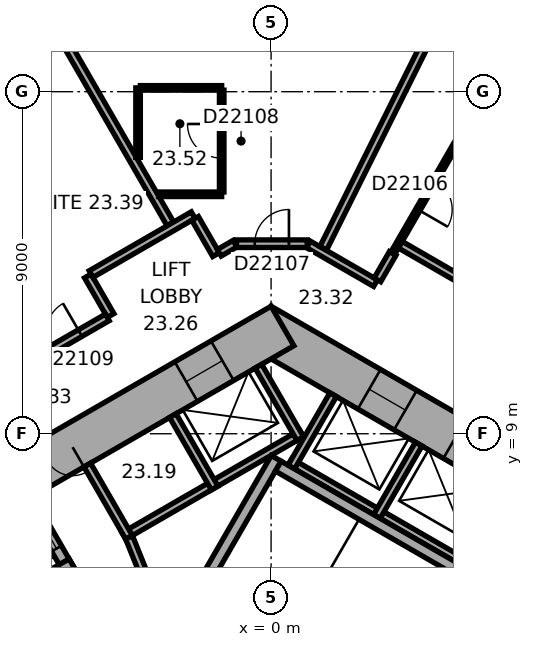
"""IFC4 building model, lengths in metres.
Left out: names, types, materials, properties, quantities, classifications, styles, units other than length and angle.
Written with IfcOpenShell. Run it as: python <this file> out.ifc"""

import sys

from ifc_helpers import new_model, si_unit, direction, frame, frame_2d, origin, place, context, subcontext, project, spatial, rectangle, extrude, element, fill, save


model = new_model("IFC4")
c1 = context("Model", 3, precision=1e-05, world=origin(), true_north=direction((0.0, 1.0)))
c2 = subcontext(c1, "Body", "Model", "MODEL_VIEW")
j1 = project(units=[si_unit("LENGTHUNIT", "METRE"), si_unit("PLANEANGLEUNIT", "RADIAN")], contexts=[c1])
p1 = place(None, origin())
s1 = spatial("IfcSite", under=j1, at=p1, CompositionType="ELEMENT")
p2 = place(p1, origin())
s2 = spatial("IfcBuilding", under=s1, at=p2, CompositionType="ELEMENT")
p3 = place(p2, frame((0.0, 0.0, 100.1)))
s3 = spatial("IfcBuildingStorey", under=s2, at=p3, CompositionType="ELEMENT", Elevation=100.1)
p4 = place(p3, frame((10.4, 5.658, 0.0), z_axis=(0.0, 0.0, 1.0), x_axis=(-0.866021384402, 0.500006961711, 0.0)))
e1 = element("IfcWall", 1, at=p4, inside=s3, PredefinedType="SHEAR", context=c2, shape_type="SweptSolid", body=[
    extrude(rectangle(XDim=12.355, YDim=1.2, at=frame_2d((6.178, 0.0))), origin(), (0.0, 0.0, 1.0), 3.3),
])
p5 = place(p4, frame((2.728, 0.0, 0.0)))
e2 = element("IfcOpeningElement", 2, at=p5, cuts=e1, PredefinedType="OPENING", context=c2, shape_type="SweptSolid", body=[
    extrude(rectangle(XDim=1.1, YDim=2.1, at=frame_2d((0.55, 1.05))), frame((0.0, 0.61, 0.0), z_axis=(0.0, -1.0, 0.0), x_axis=(1.0, 0.0, 0.0)), (0.0, 0.0, 1.0), 1.22),
])
p6 = place(p4, frame((5.328, 0.0, 0.0)))
e3 = element("IfcOpeningElement", 3, at=p6, cuts=e1, PredefinedType="OPENING", context=c2, shape_type="SweptSolid", body=[
    extrude(rectangle(XDim=1.1, YDim=2.1, at=frame_2d((0.55, 1.05))), frame((0.0, 0.61, 0.0), z_axis=(0.0, -1.0, 0.0), x_axis=(1.0, 0.0, 0.0)), (0.0, 0.0, 1.0), 1.22),
])
p7 = place(p4, frame((7.928, 0.0, 0.0)))
e4 = element("IfcOpeningElement", 4, at=p7, cuts=e1, PredefinedType="OPENING", context=c2, shape_type="SweptSolid", body=[
    extrude(rectangle(XDim=1.1, YDim=2.1, at=frame_2d((0.55, 1.05))), frame((0.0, 0.61, 0.0), z_axis=(0.0, -1.0, 0.0), x_axis=(1.0, 0.0, 0.0)), (0.0, 0.0, 1.0), 1.22),
])
p8 = place(p3, frame((0.3, 11.836, 0.0), z_axis=(0.0, 0.0, 1.0), x_axis=(-0.866021384402, -0.500006961711, 0.0)))
e5 = element("IfcWall", 5, at=p8, inside=s3, PredefinedType="SHEAR", context=c2, shape_type="SweptSolid", body=[
    extrude(rectangle(XDim=12.355, YDim=1.2, at=frame_2d((6.178, 0.0))), origin(), (0.0, 0.0, 1.0), 3.3),
])
p9 = place(p8, frame((6.378, 0.0, 0.0)))
e6 = element("IfcOpeningElement", 6, at=p9, cuts=e5, PredefinedType="OPENING", context=c2, shape_type="SweptSolid", body=[
    extrude(rectangle(XDim=1.5, YDim=2.1, at=frame_2d((0.75, 1.05))), frame((0.0, 0.61, 0.0), z_axis=(0.0, -1.0, 0.0), x_axis=(1.0, 0.0, 0.0)), (0.0, 0.0, 1.0), 1.22),
])
p10 = place(p8, frame((1.828, 0.0, 0.0)))
e7 = element("IfcOpeningElement", 7, at=p10, cuts=e5, PredefinedType="OPENING", context=c2, shape_type="SweptSolid", body=[
    extrude(rectangle(XDim=1.1, YDim=2.1, at=frame_2d((0.55, 1.05))), frame((0.0, 0.61, 0.0), z_axis=(0.0, -1.0, 0.0), x_axis=(1.0, 0.0, 0.0)), (0.0, 0.0, 1.0), 1.22),
])
p11 = place(p3, frame((20.63, 15.47, 0.0), z_axis=(0.0, 0.0, 1.0), x_axis=(-0.894934518609, 0.446197498203, 0.0)))
e8 = element("IfcWall", 8, at=p11, inside=s3, PredefinedType="STANDARD", context=c2, shape_type="SweptSolid", body=[
    extrude(rectangle(XDim=21.246, YDim=0.2, at=frame_2d((10.623, 0.0))), origin(), (0.0, 0.0, 1.0), 3.3),
])
p12 = place(p11, frame((1.553, 0.0, 0.8)))
e9 = element("IfcOpeningElement", 9, at=p12, cuts=e8, PredefinedType="OPENING", context=c2, shape_type="SweptSolid", body=[
    extrude(rectangle(XDim=2.4, YDim=1.7, at=frame_2d((1.2, 0.85))), frame((0.0, 0.11, 0.0), z_axis=(0.0, -1.0, 0.0), x_axis=(1.0, 0.0, 0.0)), (0.0, 0.0, 1.0), 0.22),
])
p13 = place(p11, frame((5.488, 0.0, 0.8)))
e10 = element("IfcOpeningElement", 10, at=p13, cuts=e8, PredefinedType="OPENING", context=c2, shape_type="SweptSolid", body=[
    extrude(rectangle(XDim=2.4, YDim=1.7, at=frame_2d((1.2, 0.85))), frame((0.0, 0.11, 0.0), z_axis=(0.0, -1.0, 0.0), x_axis=(1.0, 0.0, 0.0)), (0.0, 0.0, 1.0), 0.22),
])
p14 = place(p11, frame((9.422, 0.0, 0.8)))
e11 = element("IfcOpeningElement", 11, at=p14, cuts=e8, PredefinedType="OPENING", context=c2, shape_type="SweptSolid", body=[
    extrude(rectangle(XDim=2.4, YDim=1.7, at=frame_2d((1.2, 0.85))), frame((0.0, 0.11, 0.0), z_axis=(0.0, -1.0, 0.0), x_axis=(1.0, 0.0, 0.0)), (0.0, 0.0, 1.0), 0.22),
])
p15 = place(p11, frame((13.357, 0.0, 0.8)))
e12 = element("IfcOpeningElement", 12, at=p15, cuts=e8, PredefinedType="OPENING", context=c2, shape_type="SweptSolid", body=[
    extrude(rectangle(XDim=2.4, YDim=1.7, at=frame_2d((1.2, 0.85))), frame((0.0, 0.11, 0.0), z_axis=(0.0, -1.0, 0.0), x_axis=(1.0, 0.0, 0.0)), (0.0, 0.0, 1.0), 0.22),
])
p16 = place(p11, frame((17.292, 0.0, 0.8)))
e13 = element("IfcOpeningElement", 13, at=p16, cuts=e8, PredefinedType="OPENING", context=c2, shape_type="SweptSolid", body=[
    extrude(rectangle(XDim=2.4, YDim=1.7, at=frame_2d((1.2, 0.85))), frame((0.0, 0.11, 0.0), z_axis=(0.0, -1.0, 0.0), x_axis=(1.0, 0.0, 0.0)), (0.0, 0.0, 1.0), 0.22),
])
p17 = place(p3, frame((-3.136, 24.805, 0.0), z_axis=(0.0, 0.0, 1.0), x_axis=(-0.866028291626, -0.499994998079, 0.0)))
e14 = element("IfcWall", 14, at=p17, inside=s3, PredefinedType="STANDARD", context=c2, shape_type="SweptSolid", body=[
    extrude(rectangle(XDim=21.246, YDim=0.2, at=frame_2d((10.623, 0.0))), origin(), (0.0, 0.0, 1.0), 3.3),
])
p18 = place(p17, frame((1.555, 0.0, 0.8)))
e15 = element("IfcOpeningElement", 15, at=p18, cuts=e14, PredefinedType="OPENING", context=c2, shape_type="SweptSolid", body=[
    extrude(rectangle(XDim=2.4, YDim=1.7, at=frame_2d((1.2, 0.85))), frame((0.0, 0.11, 0.0), z_axis=(0.0, -1.0, 0.0), x_axis=(1.0, 0.0, 0.0)), (0.0, 0.0, 1.0), 0.22),
])
p19 = place(p17, frame((5.489, 0.0, 0.8)))
e16 = element("IfcOpeningElement", 16, at=p19, cuts=e14, PredefinedType="OPENING", context=c2, shape_type="SweptSolid", body=[
    extrude(rectangle(XDim=2.4, YDim=1.7, at=frame_2d((1.2, 0.85))), frame((0.0, 0.11, 0.0), z_axis=(0.0, -1.0, 0.0), x_axis=(1.0, 0.0, 0.0)), (0.0, 0.0, 1.0), 0.22),
])
p20 = place(p17, frame((9.424, 0.0, 0.8)))
e17 = element("IfcOpeningElement", 17, at=p20, cuts=e14, PredefinedType="OPENING", context=c2, shape_type="SweptSolid", body=[
    extrude(rectangle(XDim=2.4, YDim=1.7, at=frame_2d((1.2, 0.85))), frame((0.0, 0.11, 0.0), z_axis=(0.0, -1.0, 0.0), x_axis=(1.0, 0.0, 0.0)), (0.0, 0.0, 1.0), 0.22),
])
p21 = place(p17, frame((13.358, 0.0, 0.8)))
e18 = element("IfcOpeningElement", 18, at=p21, cuts=e14, PredefinedType="OPENING", context=c2, shape_type="SweptSolid", body=[
    extrude(rectangle(XDim=2.4, YDim=1.7, at=frame_2d((1.2, 0.85))), frame((0.0, 0.11, 0.0), z_axis=(0.0, -1.0, 0.0), x_axis=(1.0, 0.0, 0.0)), (0.0, 0.0, 1.0), 0.22),
])
p22 = place(p17, frame((17.293, 0.0, 0.8)))
e19 = element("IfcOpeningElement", 19, at=p22, cuts=e14, PredefinedType="OPENING", context=c2, shape_type="SweptSolid", body=[
    extrude(rectangle(XDim=2.4, YDim=1.7, at=frame_2d((1.2, 0.85))), frame((0.0, 0.11, 0.0), z_axis=(0.0, -1.0, 0.0), x_axis=(1.0, 0.0, 0.0)), (0.0, 0.0, 1.0), 0.22),
])
p23 = place(p3, frame((7.424, 4.259, 0.0), z_axis=(0.0, 0.0, 1.0), x_axis=(-0.866026010844, 0.49999894854, 0.0)))
e20 = element("IfcWall", 20, at=p23, inside=s3, PredefinedType="PARTITIONING", context=c2, shape_type="SweptSolid", body=[
    extrude(rectangle(XDim=8.0, YDim=0.2, at=frame_2d((4.0, 0.0))), origin(), (0.0, 0.0, 1.0), 3.05),
])
for number, where, z_axis, x_axis in (
    (21, (2.784, 6.822, 0.0), (0.0, 0.0, 1.0), (0.5, 0.866, 0.0)),
    (22, (0.532, 8.122, 0.0), (0.0, 0.0, 1.0), (0.5, 0.866, 0.0)),
):
    element("IfcWall", number, at=place(p3, frame(where, z_axis=z_axis, x_axis=x_axis)), inside=s3, PredefinedType="PARTITIONING", context=c2, shape_type="SweptSolid", body=[
        extrude(rectangle(XDim=2.2, YDim=0.2, at=frame_2d((1.1, 0.0))), origin(), (0.0, 0.0, 1.0), 3.05),
    ])
p24 = place(p3, frame((0.803, 9.009, 0.0), z_axis=(0.0, 0.0, 1.0), x_axis=(-0.866028230842, -0.499995103361, 0.0)))
e23 = element("IfcWall", 23, at=p24, inside=s3, PredefinedType="PARTITIONING", context=c2, shape_type="SweptSolid", body=[
    extrude(rectangle(XDim=5.4, YDim=0.2, at=frame_2d((2.7, 0.0))), origin(), (0.0, 0.0, 1.0), 3.05),
])
p25 = place(p3, frame((0.767, 8.872, 0.0), z_axis=(0.0, 0.0, 1.0), x_axis=(-0.499994660107, 0.866028486751, 0.0)))
e24 = element("IfcWall", 24, at=p25, inside=s3, PredefinedType="PARTITIONING", context=c2, shape_type="SweptSolid", body=[
    extrude(rectangle(XDim=2.2, YDim=0.2, at=frame_2d((1.1, 0.0))), origin(), (0.0, 0.0, 1.0), 3.05),
])
for number, where, z_axis, x_axis in (
    (25, (-1.485, 7.572, 0.0), (0.0, 0.0, 1.0), (-0.5, 0.866, 0.0)),
    (26, (-3.737, 6.272, 0.0), (0.0, 0.0, 1.0), (-0.5, 0.866, 0.0)),
):
    element("IfcWall", number, at=place(p3, frame(where, z_axis=z_axis, x_axis=x_axis)), inside=s3, PredefinedType="PARTITIONING", context=c2, shape_type="SweptSolid", body=[
        extrude(rectangle(XDim=2.2, YDim=0.2, at=frame_2d((1.1, 0.0))), origin(), (0.0, 0.0, 1.0), 3.05),
    ])
p26 = place(p3, frame((-2.216, 4.282, 0.0), z_axis=(0.0, 0.0, 1.0), x_axis=(0.499977259774, 0.866038532462, 0.0)))
e27 = element("IfcWall", 27, at=p26, inside=s3, PredefinedType="SHEAR", context=c2, shape_type="SweptSolid", body=[
    extrude(rectangle(XDim=4.7, YDim=0.3, at=frame_2d((2.35, 0.0))), origin(), (0.0, 0.0, 1.0), 3.05),
])
p27 = place(p3, frame((6.303, 4.617, 0.0), z_axis=(0.0, 0.0, 1.0), x_axis=(-0.866027801685, 0.499995846692, 0.0)))
e28 = element("IfcWall", 28, at=p27, inside=s3, PredefinedType="SHEAR", context=c2, shape_type="SweptSolid", body=[
    extrude(rectangle(XDim=7.06, YDim=0.3, at=frame_2d((3.53, 0.0))), origin(), (0.0, 0.0, 1.0), 3.05),
])
p28 = place(p3, frame((-5.295, 5.372, 0.0), z_axis=(0.0, 0.0, 1.0), x_axis=(-0.500077893725, 0.86598042715, 0.0)))
e29 = element("IfcWall", 29, at=p28, inside=s3, PredefinedType="SHEAR", context=c2, shape_type="SweptSolid", body=[
    extrude(rectangle(XDim=2.2, YDim=0.3, at=frame_2d((1.1, 0.0))), origin(), (0.0, 0.0, 1.0), 3.05),
])
p29 = place(p28, frame((0.7, 0.0, 0.0)))
e30 = element("IfcOpeningElement", 30, at=p29, cuts=e29, PredefinedType="OPENING", context=c2, shape_type="SweptSolid", body=[
    extrude(rectangle(XDim=1.1, YDim=2.1, at=frame_2d((0.55, 1.05))), frame((0.0, 0.16, 0.0), z_axis=(0.0, -1.0, 0.0), x_axis=(1.0, 0.0, 0.0)), (0.0, 0.0, 1.0), 0.32),
])
p30 = place(p3, frame((-5.24, 5.577, 0.0), z_axis=(0.0, 0.0, 1.0), x_axis=(-0.866014461049, -0.500018952895, 0.0)))
e31 = element("IfcWall", 31, at=p30, inside=s3, PredefinedType="SHEAR", context=c2, shape_type="SweptSolid", body=[
    extrude(rectangle(XDim=3.35, YDim=0.3, at=frame_2d((1.675, 0.0))), origin(), (0.0, 0.0, 1.0), 3.05),
])
p31 = place(p3, frame((-2.615, 3.487, 0.0), z_axis=(0.0, 0.0, 1.0), x_axis=(-0.373576831041, 0.92759924068, 0.0)))
e32 = element("IfcWall", 32, at=p31, inside=s3, PredefinedType="PARTITIONING", context=c2, shape_type="SweptSolid", body=[
    extrude(rectangle(XDim=3.002, YDim=0.2, at=frame_2d((1.501, 0.0))), origin(), (0.0, 0.0, 1.0), 3.05),
])
p32 = place(p31, frame((1.15, 0.0, 0.0)))
e33 = element("IfcOpeningElement", 33, at=p32, cuts=e32, PredefinedType="OPENING", context=c2, shape_type="SweptSolid", body=[
    extrude(rectangle(XDim=0.9, YDim=2.1, at=frame_2d((0.45, 1.05))), frame((0.0, 0.11, 0.0), z_axis=(0.0, -1.0, 0.0), x_axis=(1.0, 0.0, 0.0)), (0.0, 0.0, 1.0), 0.22),
])
p33 = place(p3, frame((-6.676, 21.492, 0.0), z_axis=(0.0, 0.0, 1.0), x_axis=(0.500011263043, -0.866018900966, 0.0)))
e34 = element("IfcWall", 34, at=p33, inside=s3, PredefinedType="PARTITIONING", context=c2, shape_type="SweptSolid", body=[
    extrude(rectangle(XDim=8.049, YDim=0.2, at=frame_2d((4.024, 0.0))), origin(), (0.0, 0.0, 1.0), 3.05),
])
p34 = place(p3, frame((-4.823, 13.152, 0.0), z_axis=(0.0, 0.0, 1.0), x_axis=(0.499986357472, -0.866033280158, 0.0)))
e35 = element("IfcWall", 35, at=p34, inside=s3, PredefinedType="PARTITIONING", context=c2, shape_type="SweptSolid", body=[
    extrude(rectangle(XDim=1.201, YDim=0.2, at=frame_2d((0.601, 0.0))), origin(), (0.0, 0.0, 1.0), 3.05),
])
p35 = place(p3, frame((-4.309, 12.061, 0.0), z_axis=(0.0, 0.0, 1.0), x_axis=(-0.866020679205, -0.500008183122, 0.0)))
e36 = element("IfcWall", 36, at=p35, inside=s3, PredefinedType="PARTITIONING", context=c2, shape_type="SweptSolid", body=[
    extrude(rectangle(XDim=5.104, YDim=0.2, at=frame_2d((2.552, 0.0))), origin(), (0.0, 0.0, 1.0), 3.05),
])
p36 = place(p35, frame((0.827, 0.0, 0.0)))
e37 = element("IfcOpeningElement", 37, at=p36, cuts=e36, PredefinedType="OPENING", context=c2, shape_type="SweptSolid", body=[
    extrude(rectangle(XDim=0.9, YDim=2.1, at=frame_2d((0.45, 1.05))), frame((0.0, 0.11, 0.0), z_axis=(0.0, -1.0, 0.0), x_axis=(1.0, 0.0, 0.0)), (0.0, 0.0, 1.0), 0.22),
])
p37 = place(p3, frame((-3.5, 16.271, 0.0), z_axis=(0.0, 0.0, 1.0), x_axis=(0.0, 1.0, 0.0)))
e38 = element("IfcWall", 38, at=p37, inside=s3, PredefinedType="PARTITIONING", context=c2, shape_type="SweptSolid", body=[
    extrude(rectangle(XDim=1.829, YDim=0.12, at=frame_2d((0.915, 0.0))), origin(), (0.0, 0.0, 1.0), 3.05),
])
p38 = place(p3, frame((-3.44, 18.101, 0.0), z_axis=(0.0, 0.0, 1.0), x_axis=(1.0, 0.0, 0.0)))
e39 = element("IfcWall", 39, at=p38, inside=s3, PredefinedType="PARTITIONING", context=c2, shape_type="SweptSolid", body=[
    extrude(rectangle(XDim=2.14, YDim=0.12, at=frame_2d((1.07, 0.0))), origin(), (0.0, 0.0, 1.0), 3.05),
])
p39 = place(p3, frame((-2.05, 14.752, 0.0), z_axis=(0.0, 0.0, 1.0), x_axis=(-0.866030936828, -0.499990416364, 0.0)))
e40 = element("IfcWall", 40, at=p39, inside=s3, PredefinedType="PARTITIONING", context=c2, shape_type="SweptSolid", body=[
    extrude(rectangle(XDim=3.102, YDim=0.2, at=frame_2d((1.551, 0.0))), origin(), (0.0, 0.0, 1.0), 3.05),
])
p40 = place(p3, frame((-1.449, 13.712, 0.0), z_axis=(0.0, 0.0, 1.0), x_axis=(-0.499978356969, 0.866037899034, 0.0)))
e41 = element("IfcWall", 41, at=p40, inside=s3, PredefinedType="PARTITIONING", context=c2, shape_type="SweptSolid", body=[
    extrude(rectangle(XDim=1.101, YDim=0.2, at=frame_2d((0.551, 0.0))), origin(), (0.0, 0.0, 1.0), 3.05),
])
p41 = place(p3, frame((-1.3, 15.301, 0.0), z_axis=(0.0, 0.0, 1.0), x_axis=(-1.0, 0.0, 0.0)))
e42 = element("IfcWall", 42, at=p41, inside=s3, PredefinedType="PARTITIONING", context=c2, shape_type="SweptSolid", body=[
    extrude(rectangle(XDim=1.661, YDim=0.12, at=frame_2d((0.831, 0.0))), origin(), (0.0, 0.0, 1.0), 3.05),
])
p42 = place(p3, frame((-1.3, 18.041, 0.0), z_axis=(0.0, 0.0, 1.0), x_axis=(0.0, -1.0, 0.0)))
e43 = element("IfcWall", 43, at=p42, inside=s3, PredefinedType="PARTITIONING", context=c2, shape_type="SweptSolid", body=[
    extrude(rectangle(XDim=2.68, YDim=0.12, at=frame_2d((1.34, 0.0))), origin(), (0.0, 0.0, 1.0), 3.05),
])
p43 = place(p42, frame((0.89, 0.0, 0.0)))
e44 = element("IfcOpeningElement", 44, at=p43, cuts=e43, PredefinedType="OPENING", context=c2, shape_type="SweptSolid", body=[
    extrude(rectangle(XDim=0.9, YDim=2.1, at=frame_2d((0.45, 1.05))), frame((0.0, 0.07, 0.0), z_axis=(0.0, -1.0, 0.0), x_axis=(1.0, 0.0, 0.0)), (0.0, 0.0, 1.0), 0.14),
])
p44 = place(p3, frame((-0.95, 14.001, 0.0), z_axis=(0.0, 0.0, 1.0), x_axis=(-0.86609177584, -0.499885022602, 0.0)))
e45 = element("IfcWall", 45, at=p44, inside=s3, PredefinedType="PARTITIONING", context=c2, shape_type="SweptSolid", body=[
    extrude(rectangle(XDim=0.477, YDim=0.2, at=frame_2d((0.238, 0.0))), origin(), (0.0, 0.0, 1.0), 3.05),
])
p45 = place(p3, frame((0.95, 14.001, 0.0), z_axis=(0.0, 0.0, 1.0), x_axis=(-1.0, 0.0, 0.0)))
e46 = element("IfcWall", 46, at=p45, inside=s3, PredefinedType="PARTITIONING", context=c2, shape_type="SweptSolid", body=[
    extrude(rectangle(XDim=1.86, YDim=0.2, at=frame_2d((0.93, 0.0))), origin(), (0.0, 0.0, 1.0), 3.05),
])
p46 = place(p45, frame((0.48, 0.0, 0.0)))
e47 = element("IfcOpeningElement", 47, at=p46, cuts=e46, PredefinedType="OPENING", context=c2, shape_type="SweptSolid", body=[
    extrude(rectangle(XDim=0.9, YDim=2.1, at=frame_2d((0.45, 1.05))), frame((0.0, 0.11, 0.0), z_axis=(0.0, -1.0, 0.0), x_axis=(1.0, 0.0, 0.0)), (0.0, 0.0, 1.0), 0.22),
])
p47 = place(p3, frame((2.748, 12.962, 0.0), z_axis=(0.0, 0.0, 1.0), x_axis=(-0.866013897511, 0.50001992892, 0.0)))
e48 = element("IfcWall", 48, at=p47, inside=s3, PredefinedType="PARTITIONING", context=c2, shape_type="SweptSolid", body=[
    extrude(rectangle(XDim=2.037, YDim=0.2, at=frame_2d((1.018, 0.0))), origin(), (0.0, 0.0, 1.0), 3.05),
])
p48 = place(p3, frame((3.199, 13.743, 0.0), z_axis=(0.0, 0.0, 1.0), x_axis=(-0.500170954823, -0.865926680471, 0.0)))
e49 = element("IfcWall", 49, at=p48, inside=s3, PredefinedType="PARTITIONING", context=c2, shape_type="SweptSolid", body=[
    extrude(rectangle(XDim=0.801, YDim=0.2, at=frame_2d((0.4, 0.0))), origin(), (0.0, 0.0, 1.0), 3.05),
])
p49 = place(p3, frame((3.232, 13.8, 0.0), z_axis=(0.0, 0.0, 1.0), x_axis=(0.499993265928, 0.866029291668, 0.0)))
e50 = element("IfcWall", 50, at=p49, inside=s3, PredefinedType="PARTITIONING", context=c2, shape_type="SweptSolid", body=[
    extrude(rectangle(XDim=3.434, YDim=0.12, at=frame_2d((1.717, 0.0))), origin(), (0.0, 0.0, 1.0), 3.05),
])
p50 = place(p49, frame((1.267, 0.0, 0.0)))
e51 = element("IfcOpeningElement", 51, at=p50, cuts=e50, PredefinedType="OPENING", context=c2, shape_type="SweptSolid", body=[
    extrude(rectangle(XDim=0.9, YDim=2.1, at=frame_2d((0.45, 1.05))), frame((0.0, 0.07, 0.0), z_axis=(0.0, -1.0, 0.0), x_axis=(1.0, 0.0, 0.0)), (0.0, 0.0, 1.0), 0.14),
])
p51 = place(p3, frame((5.351, 21.859, 0.0), z_axis=(0.0, 0.0, 1.0), x_axis=(-0.446205309328, -0.894930624086, 0.0)))
e52 = element("IfcWall", 52, at=p51, inside=s3, PredefinedType="PARTITIONING", context=c2, shape_type="SweptSolid", body=[
    extrude(rectangle(XDim=8.913, YDim=0.2, at=frame_2d((4.457, 0.0))), origin(), (0.0, 0.0, 1.0), 2.6),
])
p52 = place(p3, frame((10.885, 9.652, 0.0), z_axis=(0.0, 0.0, 1.0), x_axis=(-0.866033630405, 0.499985750804, 0.0)))
e53 = element("IfcWall", 53, at=p52, inside=s3, PredefinedType="PARTITIONING", context=c2, shape_type="SweptSolid", body=[
    extrude(rectangle(XDim=8.642, YDim=0.2, at=frame_2d((4.321, 0.0))), origin(), (0.0, 0.0, 1.0), 3.05),
])
p53 = place(p52, frame((2.276, 0.0, 0.0)))
e54 = element("IfcOpeningElement", 54, at=p53, cuts=e53, PredefinedType="OPENING", context=c2, shape_type="SweptSolid", body=[
    extrude(rectangle(XDim=0.9, YDim=2.1, at=frame_2d((0.45, 1.05))), frame((0.0, 0.11, 0.0), z_axis=(0.0, -1.0, 0.0), x_axis=(1.0, 0.0, 0.0)), (0.0, 0.0, 1.0), 0.22),
])
p54 = place(p9, origin())
e55 = element("IfcDoor", 55, at=p54, inside=s3, OperationType="DOUBLE_DOOR_SINGLE_SWING", PredefinedType="DOOR", context=c2, shape_type="SweptSolid", body=[
    extrude(rectangle(XDim=1.5, YDim=2.1, at=frame_2d((0.75, 1.05))), frame((0.0, 0.025, 0.0), z_axis=(0.0, -1.0, 0.0), x_axis=(1.0, 0.0, 0.0)), (0.0, 0.0, 1.0), 0.05),
])
fill(e6, e55)
p55 = place(p29, origin())
e56 = element("IfcDoor", 56, at=p55, inside=s3, OperationType="DOUBLE_DOOR_SLIDING", PredefinedType="DOOR", context=c2, shape_type="SweptSolid", body=[
    extrude(rectangle(XDim=1.1, YDim=2.1, at=frame_2d((0.55, 1.05))), frame((0.0, 0.025, 0.0), z_axis=(0.0, -1.0, 0.0), x_axis=(1.0, 0.0, 0.0)), (0.0, 0.0, 1.0), 0.05),
])
fill(e30, e56)
p56 = place(p7, origin())
e57 = element("IfcDoor", 57, at=p56, inside=s3, OperationType="DOUBLE_DOOR_SLIDING", PredefinedType="DOOR", context=c2, shape_type="SweptSolid", body=[
    extrude(rectangle(XDim=1.1, YDim=2.1, at=frame_2d((0.55, 1.05))), frame((0.0, 0.025, 0.0), z_axis=(0.0, -1.0, 0.0), x_axis=(1.0, 0.0, 0.0)), (0.0, 0.0, 1.0), 0.05),
])
fill(e4, e57)
p57 = place(p10, origin())
e58 = element("IfcDoor", 58, at=p57, inside=s3, OperationType="DOUBLE_DOOR_SLIDING", PredefinedType="DOOR", context=c2, shape_type="SweptSolid", body=[
    extrude(rectangle(XDim=1.1, YDim=2.1, at=frame_2d((0.55, 1.05))), frame((0.0, 0.025, 0.0), z_axis=(0.0, -1.0, 0.0), x_axis=(1.0, 0.0, 0.0)), (0.0, 0.0, 1.0), 0.05),
])
fill(e7, e58)
p58 = place(p50, origin())
e59 = element("IfcDoor", 59, at=p58, inside=s3, OperationType="SINGLE_SWING_LEFT", PredefinedType="DOOR", context=c2, shape_type="SweptSolid", body=[
    extrude(rectangle(XDim=0.9, YDim=2.1, at=frame_2d((0.45, 1.05))), frame((0.0, 0.025, 0.0), z_axis=(0.0, -1.0, 0.0), x_axis=(1.0, 0.0, 0.0)), (0.0, 0.0, 1.0), 0.05),
])
fill(e51, e59)
p59 = place(p46, origin())
e60 = element("IfcDoor", 60, at=p59, inside=s3, OperationType="SINGLE_SWING_LEFT", PredefinedType="DOOR", context=c2, shape_type="SweptSolid", body=[
    extrude(rectangle(XDim=0.9, YDim=2.1, at=frame_2d((0.45, 1.05))), frame((0.0, 0.025, 0.0), z_axis=(0.0, -1.0, 0.0), x_axis=(1.0, 0.0, 0.0)), (0.0, 0.0, 1.0), 0.05),
])
fill(e47, e60)
p60 = place(p43, origin())
e61 = element("IfcDoor", 61, at=p60, inside=s3, OperationType="SINGLE_SWING_LEFT", PredefinedType="DOOR", context=c2, shape_type="SweptSolid", body=[
    extrude(rectangle(XDim=0.9, YDim=2.1, at=frame_2d((0.45, 1.05))), frame((0.0, 0.025, 0.0), z_axis=(0.0, -1.0, 0.0), x_axis=(1.0, 0.0, 0.0)), (0.0, 0.0, 1.0), 0.05),
])
fill(e44, e61)
p61 = place(p36, origin())
e62 = element("IfcDoor", 62, at=p61, inside=s3, OperationType="SINGLE_SWING_LEFT", PredefinedType="DOOR", context=c2, shape_type="SweptSolid", body=[
    extrude(rectangle(XDim=0.9, YDim=2.1, at=frame_2d((0.45, 1.05))), frame((0.0, 0.025, 0.0), z_axis=(0.0, -1.0, 0.0), x_axis=(1.0, 0.0, 0.0)), (0.0, 0.0, 1.0), 0.05),
])
fill(e37, e62)
save(model, sys.argv[1])
